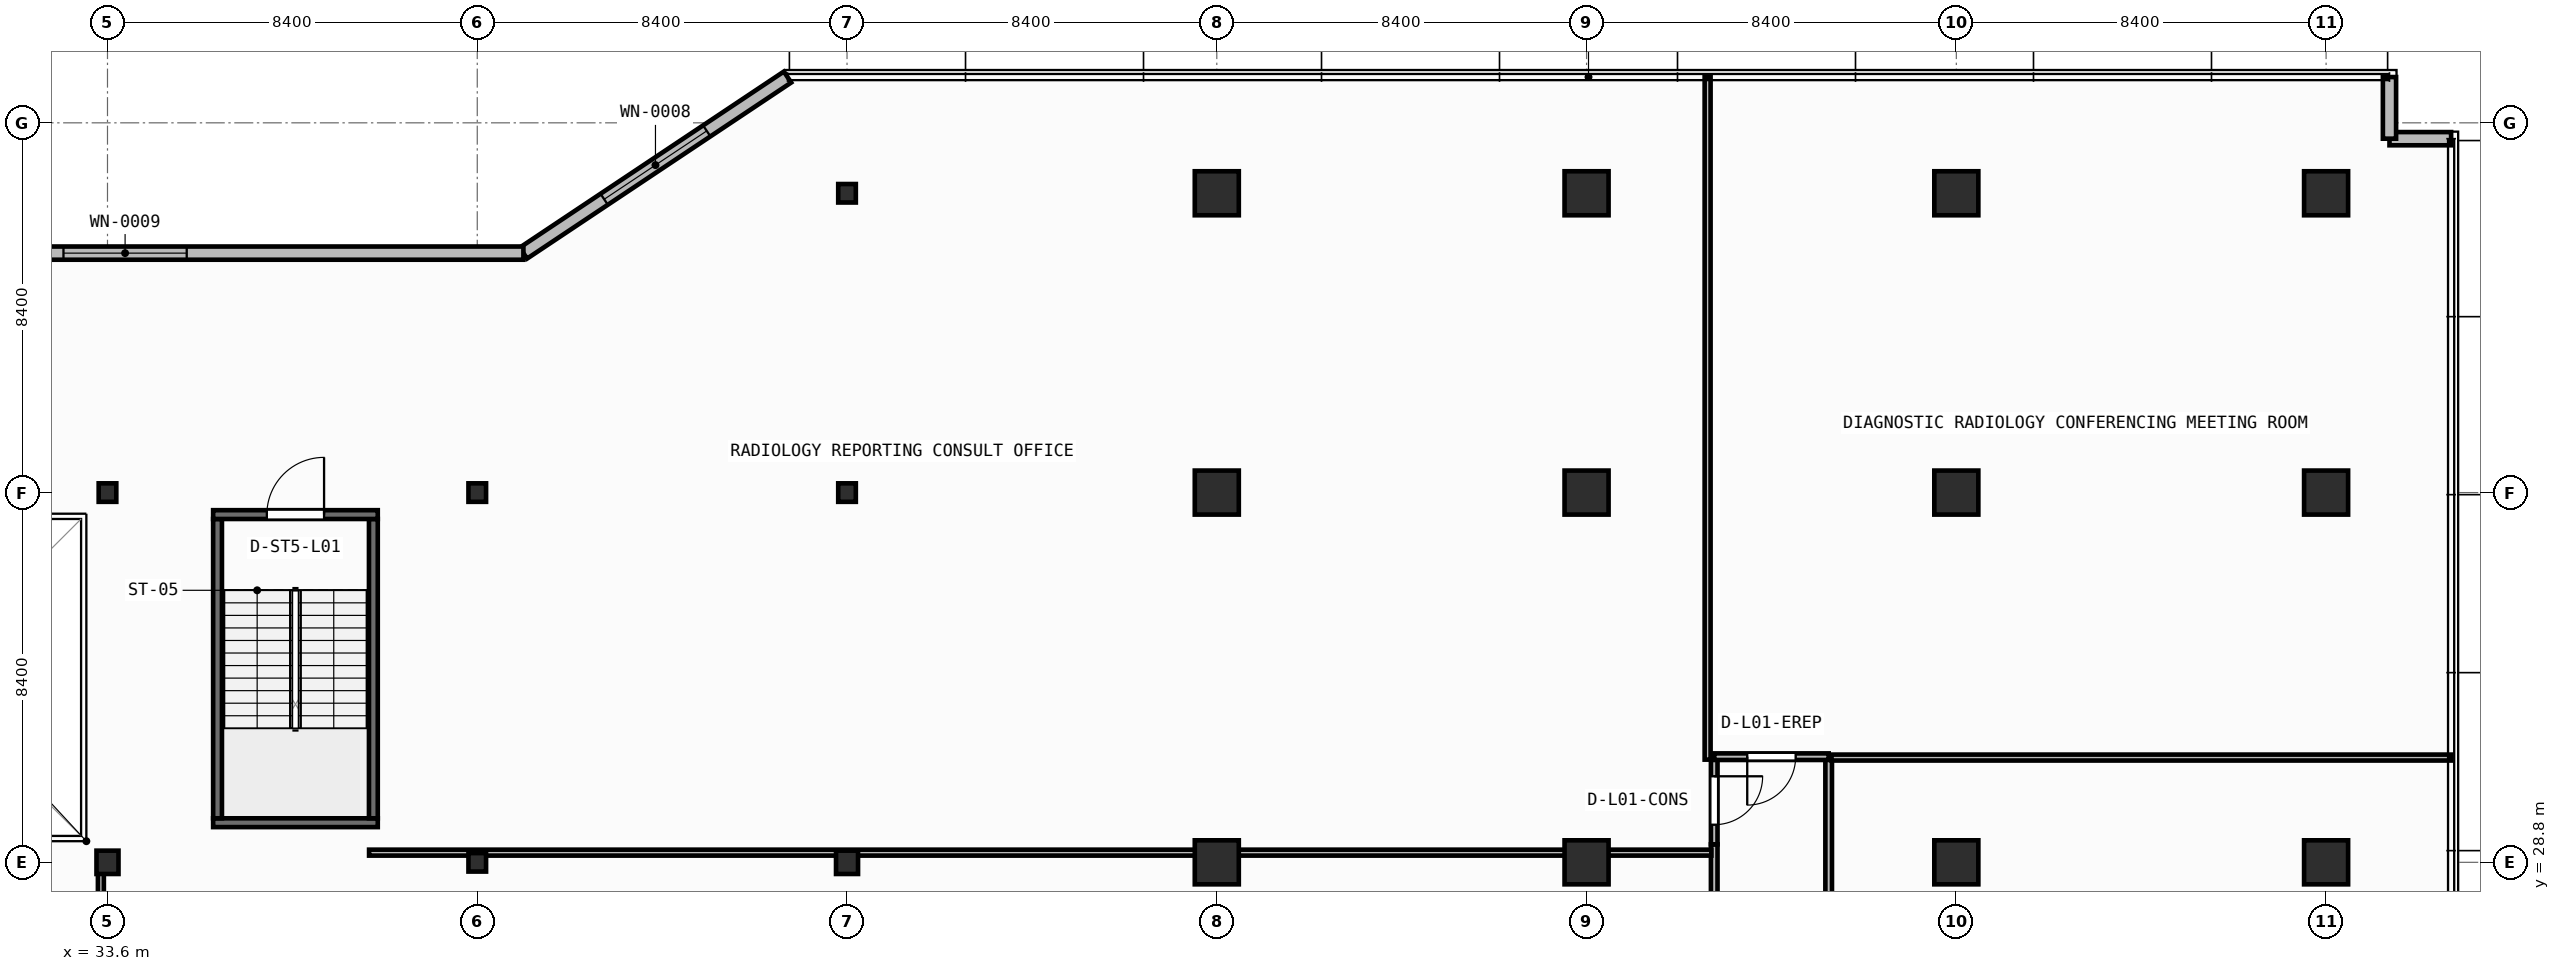
"""IFC4 building model, lengths in metres.
Left out: names, types, materials, properties, quantities, classifications, styles, units other than length and angle.
Written with IfcOpenShell. Run it as: python <this file> out.ifc"""

import sys

from ifc_helpers import new_model, si_unit, direction, frame, frame_2d, origin, origin_2d, place, context, subcontext, project, spatial, rectangle, circle, i_section, extrude, element, fill, save


model = new_model("IFC4")
c1 = context("Model", 3, precision=1e-05, world=origin(), true_north=direction((0.0, 1.0)))
c2 = subcontext(c1, "Body", "Model", "MODEL_VIEW")
j1 = project(units=[si_unit("LENGTHUNIT", "METRE"), si_unit("PLANEANGLEUNIT", "RADIAN")], contexts=[c1])
p1 = place(None, origin())
s1 = spatial("IfcSite", under=j1, at=p1, CompositionType="ELEMENT")
p2 = place(p1, origin())
s2 = spatial("IfcBuilding", under=s1, at=p2, CompositionType="ELEMENT")
p3 = place(p2, frame((0.0, 0.0, 4.5)))
s3 = spatial("IfcBuildingStorey", under=s2, at=p3, CompositionType="ELEMENT", Elevation=4.5)
p4 = place(p3, frame((33.6, 28.8, 0.0), z_axis=(0.0, 0.0, 1.0), x_axis=(1.0, 0.0, 0.0)))
e1 = element("IfcColumn", 1, at=p4, inside=s3, PredefinedType="COLUMN", context=c2, shape_type="SweptSolid", body=[
    extrude(i_section(OverallWidth=0.5, OverallDepth=0.53, WebThickness=0.028, FlangeThickness=0.045, at=origin_2d()), origin(), (0.0, 0.0, 1.0), 4.5),
])
p5 = place(p3, frame((42.0, 28.8, 0.0), z_axis=(0.0, 0.0, 1.0), x_axis=(1.0, 0.0, 0.0)))
e2 = element("IfcColumn", 2, at=p5, inside=s3, PredefinedType="COLUMN", context=c2, shape_type="SweptSolid", body=[
    extrude(i_section(OverallWidth=0.4, OverallDepth=0.42, WebThickness=0.025, FlangeThickness=0.04, at=origin_2d()), origin(), (0.0, 0.0, 1.0), 4.5),
])
p6 = place(p3, frame((50.4, 28.8, 0.0), z_axis=(0.0, 0.0, 1.0), x_axis=(1.0, 0.0, 0.0)))
e3 = element("IfcColumn", 3, at=p6, inside=s3, PredefinedType="COLUMN", context=c2, shape_type="SweptSolid", body=[
    extrude(i_section(OverallWidth=0.5, OverallDepth=0.53, WebThickness=0.028, FlangeThickness=0.045, at=origin_2d()), origin(), (0.0, 0.0, 1.0), 4.5),
])
for number, where, z_axis, x_axis in (
    (4, (58.8, 28.8, 0.0), (0.0, 0.0, 1.0), (1.0, 0.0, 0.0)),
    (5, (67.2, 28.8, 0.0), (0.0, 0.0, 1.0), (1.0, 0.0, 0.0)),
    (6, (75.6, 28.8, 0.0), (0.0, 0.0, 1.0), (1.0, 0.0, 0.0)),
    (7, (84.0, 28.8, 0.0), (0.0, 0.0, 1.0), (1.0, 0.0, 0.0)),
):
    element("IfcColumn", number, at=place(p3, frame(where, z_axis=z_axis, x_axis=x_axis)), inside=s3, PredefinedType="COLUMN", context=c2, shape_type="SweptSolid", body=[
        extrude(circle(Radius=0.5, at=origin_2d()), origin(), (0.0, 0.0, 1.0), 4.5),
    ])
for number, where, z_axis, x_axis in (
    (8, (33.6, 37.2, 0.0), (0.0, 0.0, 1.0), (1.0, 0.0, 0.0)),
    (9, (42.0, 37.2, 0.0), (0.0, 0.0, 1.0), (1.0, 0.0, 0.0)),
    (10, (50.4, 37.2, 0.0), (0.0, 0.0, 1.0), (1.0, 0.0, 0.0)),
):
    element("IfcColumn", number, at=place(p3, frame(where, z_axis=z_axis, x_axis=x_axis)), inside=s3, PredefinedType="COLUMN", context=c2, shape_type="SweptSolid", body=[
        extrude(i_section(OverallWidth=0.4, OverallDepth=0.42, WebThickness=0.025, FlangeThickness=0.04, at=origin_2d()), origin(), (0.0, 0.0, 1.0), 4.5),
    ])
for number, where, z_axis, x_axis in (
    (11, (58.8, 37.2, 0.0), (0.0, 0.0, 1.0), (1.0, 0.0, 0.0)),
    (12, (67.2, 37.2, 0.0), (0.0, 0.0, 1.0), (1.0, 0.0, 0.0)),
    (13, (75.6, 37.2, 0.0), (0.0, 0.0, 1.0), (1.0, 0.0, 0.0)),
    (14, (84.0, 37.2, 0.0), (0.0, 0.0, 1.0), (1.0, 0.0, 0.0)),
):
    element("IfcColumn", number, at=place(p3, frame(where, z_axis=z_axis, x_axis=x_axis)), inside=s3, PredefinedType="COLUMN", context=c2, shape_type="SweptSolid", body=[
        extrude(circle(Radius=0.5, at=origin_2d()), origin(), (0.0, 0.0, 1.0), 4.5),
    ])
p7 = place(p3, frame((50.4, 44.0, 0.0), z_axis=(0.0, 0.0, 1.0), x_axis=(1.0, 0.0, 0.0)))
e15 = element("IfcColumn", 15, at=p7, inside=s3, PredefinedType="COLUMN", context=c2, shape_type="SweptSolid", body=[
    extrude(i_section(OverallWidth=0.4, OverallDepth=0.42, WebThickness=0.025, FlangeThickness=0.04, at=origin_2d()), origin(), (0.0, 0.0, 1.0), 4.5),
])
for number, where, z_axis, x_axis in (
    (16, (58.8, 44.0, 0.0), (0.0, 0.0, 1.0), (1.0, 0.0, 0.0)),
    (17, (67.2, 44.0, 0.0), (0.0, 0.0, 1.0), (1.0, 0.0, 0.0)),
    (18, (75.6, 44.0, 0.0), (0.0, 0.0, 1.0), (1.0, 0.0, 0.0)),
    (19, (84.0, 44.0, 0.0), (0.0, 0.0, 1.0), (1.0, 0.0, 0.0)),
):
    element("IfcColumn", number, at=place(p3, frame(where, z_axis=z_axis, x_axis=x_axis)), inside=s3, PredefinedType="COLUMN", context=c2, shape_type="SweptSolid", body=[
        extrude(circle(Radius=0.5, at=origin_2d()), origin(), (0.0, 0.0, 1.0), 4.5),
    ])
p8 = place(p3, frame((86.84, 45.24, 0.0), z_axis=(0.0, 0.0, 1.0), x_axis=(-1.0, 0.0, 0.0)))
e20 = element("IfcWall", 20, at=p8, inside=s3, PredefinedType="STANDARD", context=c2, shape_type="SweptSolid", body=[
    extrude(rectangle(XDim=1.4, YDim=0.3, at=frame_2d((0.7, 0.0))), origin(), (0.0, 0.0, 1.0), 4.25),
])
p9 = place(p3, frame((85.44, 45.24, 0.0), z_axis=(0.0, 0.0, 1.0), x_axis=(0.0, 1.0, 0.0)))
e21 = element("IfcWall", 21, at=p9, inside=s3, PredefinedType="STANDARD", context=c2, shape_type="SweptSolid", body=[
    extrude(rectangle(XDim=1.4, YDim=0.3, at=frame_2d((0.7, 0.0))), origin(), (0.0, 0.0, 1.0), 4.25),
])
p10 = place(p3, frame((49.048, 46.64, 0.0), z_axis=(0.0, 0.0, 1.0), x_axis=(-0.832050294338, -0.554700196225, 0.0)))
e22 = element("IfcWall", 22, at=p10, inside=s3, PredefinedType="STANDARD", context=c2, shape_type="SweptSolid", body=[
    extrude(rectangle(XDim=7.211, YDim=0.3, at=frame_2d((3.605, 0.0))), origin(), (0.0, 0.0, 1.0), 4.25),
])
p11 = place(p10, frame((2.206, 0.0, 0.85)))
e23 = element("IfcOpeningElement", 23, at=p11, cuts=e22, PredefinedType="OPENING", context=c2, shape_type="SweptSolid", body=[
    extrude(rectangle(XDim=2.8, YDim=2.1, at=frame_2d((1.4, 1.05))), frame((0.0, 0.16, 0.0), z_axis=(0.0, -1.0, 0.0), x_axis=(1.0, 0.0, 0.0)), (0.0, 0.0, 1.0), 0.32),
])
p12 = place(p3, frame((43.048, 42.64, 0.0), z_axis=(0.0, 0.0, 1.0), x_axis=(-1.0, 0.0, 0.0)))
e24 = element("IfcWall", 24, at=p12, inside=s3, PredefinedType="STANDARD", context=c2, shape_type="SweptSolid", body=[
    extrude(rectangle(XDim=18.097, YDim=0.3, at=frame_2d((9.048, 0.0))), origin(), (0.0, 0.0, 1.0), 4.25),
])
p13 = place(p12, frame((7.648, 0.0, 0.85)))
e25 = element("IfcOpeningElement", 25, at=p13, cuts=e24, PredefinedType="OPENING", context=c2, shape_type="SweptSolid", body=[
    extrude(rectangle(XDim=2.8, YDim=2.1, at=frame_2d((1.4, 1.05))), frame((0.0, 0.16, 0.0), z_axis=(0.0, -1.0, 0.0), x_axis=(1.0, 0.0, 0.0)), (0.0, 0.0, 1.0), 0.32),
])
p14 = place(p3, frame((36.0, 29.7, 0.0), z_axis=(0.0, 0.0, 1.0), x_axis=(1.0, 0.0, 0.0)))
e26 = element("IfcWall", 26, at=p14, inside=s3, PredefinedType="SHEAR", context=c2, shape_type="SweptSolid", body=[
    extrude(rectangle(XDim=3.74, YDim=0.2, at=frame_2d((1.87, 0.0))), origin(), (0.0, 0.0, 1.0), 4.25),
])
for number, where, z_axis, x_axis in (
    (27, (36.1, 29.8, 0.0), (0.0, 0.0, 1.0), (0.0, 1.0, 0.0)),
    (28, (39.64, 29.8, 0.0), (0.0, 0.0, 1.0), (0.0, 1.0, 0.0)),
):
    element("IfcWall", number, at=place(p3, frame(where, z_axis=z_axis, x_axis=x_axis)), inside=s3, PredefinedType="SHEAR", context=c2, shape_type="SweptSolid", body=[
        extrude(rectangle(XDim=6.8, YDim=0.2, at=frame_2d((3.4, 0.0))), origin(), (0.0, 0.0, 1.0), 4.25),
    ])
p15 = place(p3, frame((36.0, 36.7, 0.0), z_axis=(0.0, 0.0, 1.0), x_axis=(1.0, 0.0, 0.0)))
e29 = element("IfcWall", 29, at=p15, inside=s3, PredefinedType="SHEAR", context=c2, shape_type="SweptSolid", body=[
    extrude(rectangle(XDim=3.74, YDim=0.2, at=frame_2d((1.87, 0.0))), origin(), (0.0, 0.0, 1.0), 4.25),
])
p16 = place(p15, frame((1.22, 0.0, 0.0)))
e30 = element("IfcOpeningElement", 30, at=p16, cuts=e29, PredefinedType="OPENING", context=c2, shape_type="SweptSolid", body=[
    extrude(rectangle(XDim=1.3, YDim=2.15, at=frame_2d((0.65, 1.075))), frame((0.0, 0.11, 0.0), z_axis=(0.0, -1.0, 0.0), x_axis=(1.0, 0.0, 0.0)), (0.0, 0.0, 1.0), 0.22),
])
p17 = place(p3, frame((70.1, 29.207, 0.0), z_axis=(0.0, 0.0, 1.0), x_axis=(0.0, -1.0, 0.0)))
e31 = element("IfcWall", 31, at=p17, inside=s3, PredefinedType="PARTITIONING", context=c2, shape_type="SweptSolid", body=[
    extrude(rectangle(XDim=14.387, YDim=0.15, at=frame_2d((7.194, 0.0))), origin(), (0.0, 0.0, 1.0), 4.25),
])
p18 = place(p3, frame((72.7, 14.82, 0.0), z_axis=(0.0, 0.0, 1.0), x_axis=(0.0, 1.0, 0.0)))
e32 = element("IfcWall", 32, at=p18, inside=s3, PredefinedType="PARTITIONING", context=c2, shape_type="SweptSolid", body=[
    extrude(rectangle(XDim=16.38, YDim=0.15, at=frame_2d((8.19, 0.0))), origin(), (0.0, 0.0, 1.0), 4.25),
])
p19 = place(p3, frame((70.1, 31.2, 0.0), z_axis=(0.0, 0.0, 1.0), x_axis=(0.0, -1.0, 0.0)))
e33 = element("IfcWall", 33, at=p19, inside=s3, PredefinedType="PARTITIONING", context=c2, shape_type="SweptSolid", body=[
    extrude(rectangle(XDim=1.991, YDim=0.15, at=frame_2d((0.995, 0.0))), origin(), (0.0, 0.0, 1.0), 4.25),
])
p20 = place(p19, frame((0.445, 0.0, 0.0)))
e34 = element("IfcOpeningElement", 34, at=p20, cuts=e33, PredefinedType="OPENING", context=c2, shape_type="SweptSolid", body=[
    extrude(rectangle(XDim=1.1, YDim=2.1, at=frame_2d((0.55, 1.05))), frame((0.0, 0.085, 0.0), z_axis=(0.0, -1.0, 0.0), x_axis=(1.0, 0.0, 0.0)), (0.0, 0.0, 1.0), 0.17),
])
p21 = place(p3, frame((72.7, 31.2, 0.0), z_axis=(0.0, 0.0, 1.0), x_axis=(-1.0, 0.0, 0.0)))
e35 = element("IfcWall", 35, at=p21, inside=s3, PredefinedType="PARTITIONING", context=c2, shape_type="SweptSolid", body=[
    extrude(rectangle(XDim=2.6, YDim=0.15, at=frame_2d((1.3, 0.0))), origin(), (0.0, 0.0, 1.0), 4.25),
])
p22 = place(p21, frame((0.75, 0.0, 0.0)))
e36 = element("IfcOpeningElement", 36, at=p22, cuts=e35, PredefinedType="OPENING", context=c2, shape_type="SweptSolid", body=[
    extrude(rectangle(XDim=1.1, YDim=2.1, at=frame_2d((0.55, 1.05))), frame((0.0, 0.085, 0.0), z_axis=(0.0, -1.0, 0.0), x_axis=(1.0, 0.0, 0.0)), (0.0, 0.0, 1.0), 0.17),
])
p23 = place(p3, frame((33.45, 14.865, 0.0), z_axis=(0.0, 0.0, 1.0), x_axis=(0.0, 1.0, 0.0)))
e37 = element("IfcWall", 37, at=p23, inside=s3, PredefinedType="PARTITIONING", context=c2, shape_type="SweptSolid", body=[
    extrude(rectangle(XDim=14.155, YDim=0.135, at=frame_2d((7.078, 0.0))), origin(), (0.0, 0.0, 1.0), 3.623),
])
p24 = place(p3, frame((70.035, 29.02, 0.0), z_axis=(0.0, 0.0, 1.0), x_axis=(-1.0, 0.0, 0.0)))
e38 = element("IfcWall", 38, at=p24, inside=s3, PredefinedType="PARTITIONING", context=c2, shape_type="SweptSolid", body=[
    extrude(rectangle(XDim=30.492, YDim=0.135, at=frame_2d((15.246, 0.0))), origin(), (0.0, 0.0, 1.0), 3.425),
])
p25 = place(p3, frame((86.84, 31.18, 0.0), z_axis=(0.0, 0.0, 1.0), x_axis=(-1.0, 0.0, 0.0)))
e39 = element("IfcWall", 39, at=p25, inside=s3, PredefinedType="PARTITIONING", context=c2, shape_type="SweptSolid", body=[
    extrude(rectangle(XDim=14.075, YDim=0.135, at=frame_2d((7.038, 0.0))), origin(), (0.0, 0.0, 1.0), 4.25),
])
p26 = place(p3, frame((69.95, 31.133, 0.0), z_axis=(0.0, 0.0, 1.0), x_axis=(0.0, 1.0, 0.0)))
e40 = element("IfcWall", 40, at=p26, inside=s3, PredefinedType="PARTITIONING", context=c2, shape_type="SweptSolid", body=[
    extrude(rectangle(XDim=15.507, YDim=0.135, at=frame_2d((7.753, 0.0))), origin(), (0.0, 0.0, 1.0), 4.25),
])
p27 = place(p11, origin())
e41 = element("IfcWindow", 41, at=p27, inside=s3, PartitioningType="SINGLE_PANEL", PredefinedType="WINDOW", context=c2, shape_type="SweptSolid", body=[
    extrude(rectangle(XDim=2.8, YDim=2.1, at=frame_2d((1.4, 1.05))), frame((0.0, 0.03, 0.0), z_axis=(0.0, -1.0, 0.0), x_axis=(1.0, 0.0, 0.0)), (0.0, 0.0, 1.0), 0.06),
])
fill(e23, e41)
p28 = place(p13, origin())
e42 = element("IfcWindow", 42, at=p28, inside=s3, PartitioningType="SINGLE_PANEL", PredefinedType="WINDOW", context=c2, shape_type="SweptSolid", body=[
    extrude(rectangle(XDim=2.8, YDim=2.1, at=frame_2d((1.4, 1.05))), frame((0.0, 0.03, 0.0), z_axis=(0.0, -1.0, 0.0), x_axis=(1.0, 0.0, 0.0)), (0.0, 0.0, 1.0), 0.06),
])
fill(e25, e42)
p29 = place(p16, origin())
e43 = element("IfcDoor", 43, at=p29, inside=s3, OperationType="SINGLE_SWING_RIGHT", PredefinedType="DOOR", context=c2, shape_type="SweptSolid", body=[
    extrude(rectangle(XDim=1.3, YDim=2.15, at=frame_2d((0.65, 1.075))), frame((0.0, 0.025, 0.0), z_axis=(0.0, -1.0, 0.0), x_axis=(1.0, 0.0, 0.0)), (0.0, 0.0, 1.0), 0.05),
])
fill(e30, e43)
p30 = place(p20, origin())
e44 = element("IfcDoor", 44, at=p30, inside=s3, OperationType="SINGLE_SWING_LEFT", PredefinedType="DOOR", context=c2, shape_type="SweptSolid", body=[
    extrude(rectangle(XDim=1.1, YDim=2.1, at=frame_2d((0.55, 1.05))), frame((0.0, 0.025, 0.0), z_axis=(0.0, -1.0, 0.0), x_axis=(1.0, 0.0, 0.0)), (0.0, 0.0, 1.0), 0.05),
])
fill(e34, e44)
p31 = place(p22, origin())
e45 = element("IfcDoor", 45, at=p31, inside=s3, OperationType="SINGLE_SWING_RIGHT", PredefinedType="DOOR", context=c2, shape_type="SweptSolid", body=[
    extrude(rectangle(XDim=1.1, YDim=2.1, at=frame_2d((0.55, 1.05))), frame((0.0, 0.025, 0.0), z_axis=(0.0, -1.0, 0.0), x_axis=(1.0, 0.0, 0.0)), (0.0, 0.0, 1.0), 0.05),
])
fill(e36, e45)
save(model, sys.argv[1])
